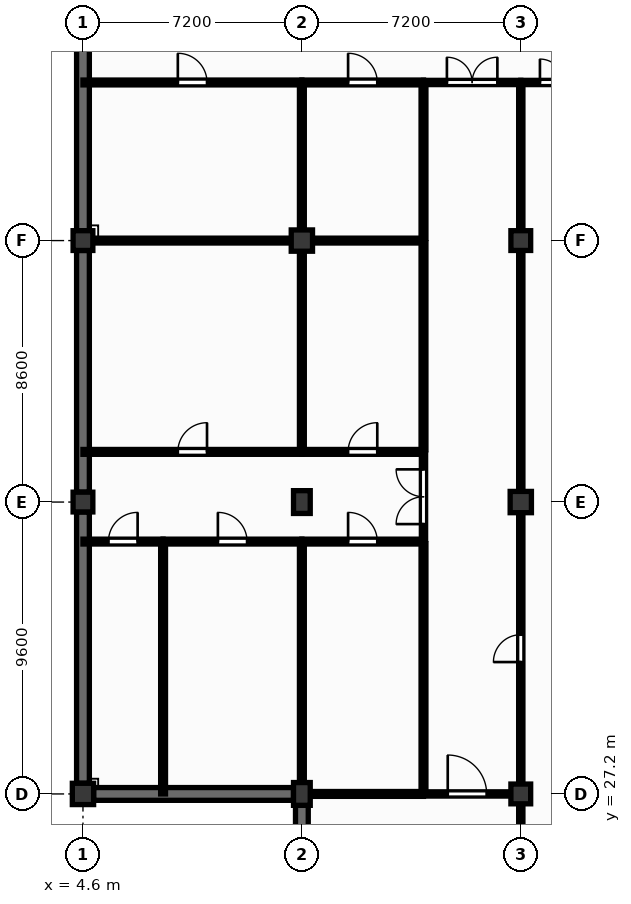
"""IFC4 building model, lengths in metres.
Left out: names, types, materials, properties, quantities, classifications, styles, units other than length and angle.
Written with IfcOpenShell. Run it as: python <this file> out.ifc"""

import sys

from ifc_helpers import new_model, si_unit, direction, frame, frame_2d, origin, origin_2d, place, context, subcontext, project, spatial, rectangle, extrude, element, fill, save


model = new_model("IFC4")
c1 = context("Model", 3, precision=1e-05, world=origin(), true_north=direction((0.0, 1.0)))
c2 = subcontext(c1, "Body", "Model", "MODEL_VIEW")
j1 = project(units=[si_unit("LENGTHUNIT", "METRE"), si_unit("PLANEANGLEUNIT", "RADIAN")], contexts=[c1])
p1 = place(None, origin())
s1 = spatial("IfcSite", under=j1, at=p1, CompositionType="ELEMENT")
p2 = place(p1, origin())
s2 = spatial("IfcBuilding", under=s1, at=p2, CompositionType="ELEMENT")
p3 = place(p2, frame((0.0, 0.0, -4.5)))
s3 = spatial("IfcBuildingStorey", under=s2, at=p3, CompositionType="ELEMENT", Elevation=-4.5)
p4 = place(p3, frame((4.6, 27.2, 0.0), z_axis=(0.0, 0.0, 1.0), x_axis=(1.0, 0.0, 0.0)))
e1 = element("IfcColumn", 1, at=p4, inside=s3, PredefinedType="COLUMN", context=c2, shape_type="SweptSolid", body=[
    extrude(rectangle(XDim=0.7, YDim=0.7, at=origin_2d()), origin(), (0.0, 0.0, 1.0), 4.2),
])
for number, where, z_axis, x_axis in (
    (2, (4.6, 36.8, 0.0), (0.0, 0.0, 1.0), (1.0, 0.0, 0.0)),
    (3, (4.6, 45.4, 0.0), (0.0, 0.0, 1.0), (1.0, 0.0, 0.0)),
):
    element("IfcColumn", number, at=place(p3, frame(where, z_axis=z_axis, x_axis=x_axis)), inside=s3, PredefinedType="COLUMN", context=c2, shape_type="SweptSolid", body=[
        extrude(rectangle(XDim=0.65, YDim=0.65, at=origin_2d()), origin(), (0.0, 0.0, 1.0), 4.2),
    ])
for number, where, z_axis, x_axis in (
    (4, (11.8, 27.2, 0.0), (0.0, 0.0, 1.0), (1.0, 0.0, 0.0)),
    (5, (11.8, 36.8, 0.0), (0.0, 0.0, 1.0), (1.0, 0.0, 0.0)),
):
    element("IfcColumn", number, at=place(p3, frame(where, z_axis=z_axis, x_axis=x_axis)), inside=s3, PredefinedType="COLUMN", context=c2, shape_type="SweptSolid", body=[
        extrude(rectangle(XDim=0.55, YDim=0.75, at=origin_2d()), origin(), (0.0, 0.0, 1.0), 4.2),
    ])
p5 = place(p3, frame((11.8, 45.4, 0.0), z_axis=(0.0, 0.0, 1.0), x_axis=(1.0, 0.0, 0.0)))
e6 = element("IfcColumn", 6, at=p5, inside=s3, PredefinedType="COLUMN", context=c2, shape_type="SweptSolid", body=[
    extrude(rectangle(XDim=0.7, YDim=0.7, at=origin_2d()), origin(), (0.0, 0.0, 1.0), 4.2),
])
p6 = place(p3, frame((19.0, 27.2, 0.0), z_axis=(0.0, 0.0, 1.0), x_axis=(1.0, 0.0, 0.0)))
e7 = element("IfcColumn", 7, at=p6, inside=s3, PredefinedType="COLUMN", context=c2, shape_type="SweptSolid", body=[
    extrude(rectangle(XDim=0.65, YDim=0.65, at=origin_2d()), origin(), (0.0, 0.0, 1.0), 4.2),
])
p7 = place(p3, frame((19.0, 36.8, 0.0), z_axis=(0.0, 0.0, 1.0), x_axis=(1.0, 0.0, 0.0)))
e8 = element("IfcColumn", 8, at=p7, inside=s3, PredefinedType="COLUMN", context=c2, shape_type="SweptSolid", body=[
    extrude(rectangle(XDim=0.7, YDim=0.7, at=origin_2d()), origin(), (0.0, 0.0, 1.0), 4.2),
])
p8 = place(p3, frame((19.0, 45.4, 0.0), z_axis=(0.0, 0.0, 1.0), x_axis=(1.0, 0.0, 0.0)))
e9 = element("IfcColumn", 9, at=p8, inside=s3, PredefinedType="COLUMN", context=c2, shape_type="SweptSolid", body=[
    extrude(rectangle(XDim=0.65, YDim=0.65, at=origin_2d()), origin(), (0.0, 0.0, 1.0), 4.2),
])
p9 = place(p3, frame((4.95, 27.2, 0.0), z_axis=(0.0, 0.0, 1.0), x_axis=(1.0, 0.0, 0.0)))
e10 = element("IfcWall", 10, at=p9, inside=s3, PredefinedType="USERDEFINED", context=c2, shape_type="SweptSolid", body=[
    extrude(rectangle(XDim=6.575, YDim=0.42, at=frame_2d((3.288, 0.0))), origin(), (0.0, 0.0, 1.0), 4.2),
])
p10 = place(p3, frame((4.6, 27.55, 0.0), z_axis=(0.0, 0.0, 1.0), x_axis=(0.0, 1.0, 0.0)))
e11 = element("IfcWall", 11, at=p10, inside=s3, PredefinedType="USERDEFINED", context=c2, shape_type="SweptSolid", body=[
    extrude(rectangle(XDim=8.925, YDim=0.42, at=frame_2d((4.462, 0.0))), origin(), (0.0, 0.0, 1.0), 4.2),
])
p11 = place(p3, frame((4.6, 37.125, 0.0), z_axis=(0.0, 0.0, 1.0), x_axis=(0.0, 1.0, 0.0)))
e12 = element("IfcWall", 12, at=p11, inside=s3, PredefinedType="USERDEFINED", context=c2, shape_type="SweptSolid", body=[
    extrude(rectangle(XDim=7.95, YDim=0.42, at=frame_2d((3.975, 0.0))), origin(), (0.0, 0.0, 1.0), 4.2),
])
p12 = place(p3, frame((4.6, 45.725, 0.0), z_axis=(0.0, 0.0, 1.0), x_axis=(0.0, 1.0, 0.0)))
e13 = element("IfcWall", 13, at=p12, inside=s3, PredefinedType="USERDEFINED", context=c2, shape_type="SweptSolid", body=[
    extrude(rectangle(XDim=6.525, YDim=0.42, at=frame_2d((3.262, 0.0))), origin(), (0.0, 0.0, 1.0), 4.2),
])
p13 = place(p3, frame((11.8, 18.95, 0.0), z_axis=(0.0, 0.0, 1.0), x_axis=(0.0, 1.0, 0.0)))
e14 = element("IfcWall", 14, at=p13, inside=s3, PredefinedType="USERDEFINED", context=c2, shape_type="SweptSolid", body=[
    extrude(rectangle(XDim=7.875, YDim=0.42, at=frame_2d((3.938, 0.0))), origin(), (0.0, 0.0, 1.0), 4.2),
])
p14 = place(p3, frame((4.6, 35.5, 0.0), z_axis=(0.0, 0.0, 1.0), x_axis=(1.0, 0.0, 0.0)))
e15 = element("IfcWall", 15, at=p14, inside=s3, PredefinedType="PARTITIONING", context=c2, shape_type="SweptSolid", body=[
    extrude(rectangle(XDim=2.635, YDim=0.16, at=frame_2d((1.317, 0.0))), origin(), (0.0, 0.0, 1.0), 4.08),
])
p15 = place(p14, frame((0.837, 0.0, 0.0)))
e16 = element("IfcOpeningElement", 16, at=p15, cuts=e15, PredefinedType="OPENING", context=c2, shape_type="SweptSolid", body=[
    extrude(rectangle(XDim=0.96, YDim=2.1, at=frame_2d((0.48, 1.05))), frame((0.0, 0.09, 0.0), z_axis=(0.0, -1.0, 0.0), x_axis=(1.0, 0.0, 0.0)), (0.0, 0.0, 1.0), 0.18),
])
p16 = place(p3, frame((4.6, 38.45, 0.0), z_axis=(0.0, 0.0, 1.0), x_axis=(1.0, 0.0, 0.0)))
e17 = element("IfcWall", 17, at=p16, inside=s3, PredefinedType="PARTITIONING", context=c2, shape_type="SweptSolid", body=[
    extrude(rectangle(XDim=7.2, YDim=0.16, at=frame_2d((3.6, 0.0))), origin(), (0.0, 0.0, 1.0), 4.08),
])
p17 = place(p16, frame((3.12, 0.0, 0.0)))
e18 = element("IfcOpeningElement", 18, at=p17, cuts=e17, PredefinedType="OPENING", context=c2, shape_type="SweptSolid", body=[
    extrude(rectangle(XDim=0.96, YDim=2.1, at=frame_2d((0.48, 1.05))), frame((0.0, 0.09, 0.0), z_axis=(0.0, -1.0, 0.0), x_axis=(1.0, 0.0, 0.0)), (0.0, 0.0, 1.0), 0.18),
])
p18 = place(p3, frame((4.925, 45.4, 0.0), z_axis=(0.0, 0.0, 1.0), x_axis=(1.0, 0.0, 0.0)))
e19 = element("IfcWall", 19, at=p18, inside=s3, PredefinedType="PARTITIONING", context=c2, shape_type="SweptSolid", body=[
    extrude(rectangle(XDim=6.525, YDim=0.16, at=frame_2d((3.262, 0.0))), origin(), (0.0, 0.0, 1.0), 3.6),
])
p19 = place(p3, frame((4.6, 50.6, 0.0), z_axis=(0.0, 0.0, 1.0), x_axis=(1.0, 0.0, 0.0)))
e20 = element("IfcWall", 20, at=p19, inside=s3, PredefinedType="PARTITIONING", context=c2, shape_type="SweptSolid", body=[
    extrude(rectangle(XDim=7.2, YDim=0.16, at=frame_2d((3.6, 0.0))), origin(), (0.0, 0.0, 1.0), 4.08),
])
p20 = place(p19, frame((3.12, 0.0, 0.0)))
e21 = element("IfcOpeningElement", 21, at=p20, cuts=e20, PredefinedType="OPENING", context=c2, shape_type="SweptSolid", body=[
    extrude(rectangle(XDim=0.96, YDim=2.1, at=frame_2d((0.48, 1.05))), frame((0.0, 0.09, 0.0), z_axis=(0.0, -1.0, 0.0), x_axis=(1.0, 0.0, 0.0)), (0.0, 0.0, 1.0), 0.18),
])
p21 = place(p3, frame((7.235, 27.2, 0.0), z_axis=(0.0, 0.0, 1.0), x_axis=(0.0, 1.0, 0.0)))
e22 = element("IfcWall", 22, at=p21, inside=s3, PredefinedType="PARTITIONING", context=c2, shape_type="SweptSolid", body=[
    extrude(rectangle(XDim=8.23, YDim=0.16, at=frame_2d((4.115, 0.0))), origin(), (0.0, 0.0, 1.0), 4.08),
])
p22 = place(p3, frame((7.235, 35.5, 0.0), z_axis=(0.0, 0.0, 1.0), x_axis=(1.0, 0.0, 0.0)))
e23 = element("IfcWall", 23, at=p22, inside=s3, PredefinedType="PARTITIONING", context=c2, shape_type="SweptSolid", body=[
    extrude(rectangle(XDim=4.565, YDim=0.16, at=frame_2d((2.282, 0.0))), origin(), (0.0, 0.0, 1.0), 4.08),
])
p23 = place(p22, frame((1.802, 0.0, 0.0)))
e24 = element("IfcOpeningElement", 24, at=p23, cuts=e23, PredefinedType="OPENING", context=c2, shape_type="SweptSolid", body=[
    extrude(rectangle(XDim=0.96, YDim=2.1, at=frame_2d((0.48, 1.05))), frame((0.0, 0.09, 0.0), z_axis=(0.0, -1.0, 0.0), x_axis=(1.0, 0.0, 0.0)), (0.0, 0.0, 1.0), 0.18),
])
p24 = place(p3, frame((11.8, 27.575, 0.0), z_axis=(0.0, 0.0, 1.0), x_axis=(0.0, 1.0, 0.0)))
e25 = element("IfcWall", 25, at=p24, inside=s3, PredefinedType="PARTITIONING", context=c2, shape_type="SweptSolid", body=[
    extrude(rectangle(XDim=7.855, YDim=0.16, at=frame_2d((3.927, 0.0))), origin(), (0.0, 0.0, 1.0), 3.4),
])
p25 = place(p3, frame((12.075, 27.2, 0.0), z_axis=(0.0, 0.0, 1.0), x_axis=(1.0, 0.0, 0.0)))
e26 = element("IfcWall", 26, at=p25, inside=s3, PredefinedType="PARTITIONING", context=c2, shape_type="SweptSolid", body=[
    extrude(rectangle(XDim=3.725, YDim=0.16, at=frame_2d((1.863, 0.0))), origin(), (0.0, 0.0, 1.0), 3.6),
])
p26 = place(p3, frame((11.8, 35.5, 0.0), z_axis=(0.0, 0.0, 1.0), x_axis=(1.0, 0.0, 0.0)))
e27 = element("IfcWall", 27, at=p26, inside=s3, PredefinedType="PARTITIONING", context=c2, shape_type="SweptSolid", body=[
    extrude(rectangle(XDim=4.0, YDim=0.16, at=frame_2d((2.0, 0.0))), origin(), (0.0, 0.0, 1.0), 4.08),
])
p27 = place(p26, frame((1.52, 0.0, 0.0)))
e28 = element("IfcOpeningElement", 28, at=p27, cuts=e27, PredefinedType="OPENING", context=c2, shape_type="SweptSolid", body=[
    extrude(rectangle(XDim=0.96, YDim=2.1, at=frame_2d((0.48, 1.05))), frame((0.0, 0.09, 0.0), z_axis=(0.0, -1.0, 0.0), x_axis=(1.0, 0.0, 0.0)), (0.0, 0.0, 1.0), 0.18),
])
p28 = place(p3, frame((11.8, 38.52, 0.0), z_axis=(0.0, 0.0, 1.0), x_axis=(0.0, 1.0, 0.0)))
e29 = element("IfcWall", 29, at=p28, inside=s3, PredefinedType="PARTITIONING", context=c2, shape_type="SweptSolid", body=[
    extrude(rectangle(XDim=6.53, YDim=0.16, at=frame_2d((3.265, 0.0))), origin(), (0.0, 0.0, 1.0), 3.5),
])
p29 = place(p3, frame((11.8, 38.45, 0.0), z_axis=(0.0, 0.0, 1.0), x_axis=(1.0, 0.0, 0.0)))
e30 = element("IfcWall", 30, at=p29, inside=s3, PredefinedType="PARTITIONING", context=c2, shape_type="SweptSolid", body=[
    extrude(rectangle(XDim=4.0, YDim=0.16, at=frame_2d((2.0, 0.0))), origin(), (0.0, 0.0, 1.0), 4.08),
])
p30 = place(p29, frame((1.52, 0.0, 0.0)))
e31 = element("IfcOpeningElement", 31, at=p30, cuts=e30, PredefinedType="OPENING", context=c2, shape_type="SweptSolid", body=[
    extrude(rectangle(XDim=0.96, YDim=2.1, at=frame_2d((0.48, 1.05))), frame((0.0, 0.09, 0.0), z_axis=(0.0, -1.0, 0.0), x_axis=(1.0, 0.0, 0.0)), (0.0, 0.0, 1.0), 0.18),
])
p31 = place(p3, frame((11.8, 45.75, 0.0), z_axis=(0.0, 0.0, 1.0), x_axis=(0.0, 1.0, 0.0)))
e32 = element("IfcWall", 32, at=p31, inside=s3, PredefinedType="PARTITIONING", context=c2, shape_type="SweptSolid", body=[
    extrude(rectangle(XDim=4.78, YDim=0.16, at=frame_2d((2.39, 0.0))), origin(), (0.0, 0.0, 1.0), 3.5),
])
p32 = place(p3, frame((12.15, 45.4, 0.0), z_axis=(0.0, 0.0, 1.0), x_axis=(1.0, 0.0, 0.0)))
e33 = element("IfcWall", 33, at=p32, inside=s3, PredefinedType="PARTITIONING", context=c2, shape_type="SweptSolid", body=[
    extrude(rectangle(XDim=3.65, YDim=0.16, at=frame_2d((1.825, 0.0))), origin(), (0.0, 0.0, 1.0), 3.6),
])
p33 = place(p3, frame((11.8, 50.6, 0.0), z_axis=(0.0, 0.0, 1.0), x_axis=(1.0, 0.0, 0.0)))
e34 = element("IfcWall", 34, at=p33, inside=s3, PredefinedType="PARTITIONING", context=c2, shape_type="SweptSolid", body=[
    extrude(rectangle(XDim=4.0, YDim=0.16, at=frame_2d((2.0, 0.0))), origin(), (0.0, 0.0, 1.0), 4.08),
])
p34 = place(p33, frame((1.52, 0.0, 0.0)))
e35 = element("IfcOpeningElement", 35, at=p34, cuts=e34, PredefinedType="OPENING", context=c2, shape_type="SweptSolid", body=[
    extrude(rectangle(XDim=0.96, YDim=2.1, at=frame_2d((0.48, 1.05))), frame((0.0, 0.09, 0.0), z_axis=(0.0, -1.0, 0.0), x_axis=(1.0, 0.0, 0.0)), (0.0, 0.0, 1.0), 0.18),
])
p35 = place(p3, frame((15.8, 27.27, 0.0), z_axis=(0.0, 0.0, 1.0), x_axis=(0.0, 1.0, 0.0)))
e36 = element("IfcWall", 36, at=p35, inside=s3, PredefinedType="PARTITIONING", context=c2, shape_type="SweptSolid", body=[
    extrude(rectangle(XDim=8.16, YDim=0.16, at=frame_2d((4.08, 0.0))), origin(), (0.0, 0.0, 1.0), 4.08),
])
p36 = place(p3, frame((15.8, 27.2, 0.0), z_axis=(0.0, 0.0, 1.0), x_axis=(1.0, 0.0, 0.0)))
e37 = element("IfcWall", 37, at=p36, inside=s3, PredefinedType="PARTITIONING", context=c2, shape_type="SweptSolid", body=[
    extrude(rectangle(XDim=2.875, YDim=0.14, at=frame_2d((1.438, 0.0))), origin(), (0.0, 0.0, 1.0), 3.6),
])
p37 = place(p36, frame((0.798, 0.0, 0.0)))
e38 = element("IfcOpeningElement", 38, at=p37, cuts=e37, PredefinedType="OPENING", context=c2, shape_type="SweptSolid", body=[
    extrude(rectangle(XDim=1.28, YDim=2.2, at=frame_2d((0.64, 1.1))), frame((0.0, 0.08, 0.0), z_axis=(0.0, -1.0, 0.0), x_axis=(1.0, 0.0, 0.0)), (0.0, 0.0, 1.0), 0.16),
])
p38 = place(p3, frame((15.8, 35.57, 0.0), z_axis=(0.0, 0.0, 1.0), x_axis=(0.0, 1.0, 0.0)))
e39 = element("IfcWall", 39, at=p38, inside=s3, PredefinedType="PARTITIONING", context=c2, shape_type="SweptSolid", body=[
    extrude(rectangle(XDim=2.81, YDim=0.14, at=frame_2d((1.405, 0.0))), origin(), (0.0, 0.0, 1.0), 4.08),
])
p39 = place(p38, frame((0.505, 0.0, 0.0)))
e40 = element("IfcOpeningElement", 40, at=p39, cuts=e39, PredefinedType="OPENING", context=c2, shape_type="SweptSolid", body=[
    extrude(rectangle(XDim=1.8, YDim=2.3, at=frame_2d((0.9, 1.15))), frame((0.0, 0.08, 0.0), z_axis=(0.0, -1.0, 0.0), x_axis=(1.0, 0.0, 0.0)), (0.0, 0.0, 1.0), 0.16),
])
p40 = place(p3, frame((15.8, 38.52, 0.0), z_axis=(0.0, 0.0, 1.0), x_axis=(0.0, 1.0, 0.0)))
e41 = element("IfcWall", 41, at=p40, inside=s3, PredefinedType="PARTITIONING", context=c2, shape_type="SweptSolid", body=[
    extrude(rectangle(XDim=6.81, YDim=0.16, at=frame_2d((3.405, 0.0))), origin(), (0.0, 0.0, 1.0), 4.08),
])
p41 = place(p3, frame((15.8, 45.47, 0.0), z_axis=(0.0, 0.0, 1.0), x_axis=(0.0, 1.0, 0.0)))
e42 = element("IfcWall", 42, at=p41, inside=s3, PredefinedType="PARTITIONING", context=c2, shape_type="SweptSolid", body=[
    extrude(rectangle(XDim=5.06, YDim=0.16, at=frame_2d((2.53, 0.0))), origin(), (0.0, 0.0, 1.0), 4.08),
])
p42 = place(p3, frame((15.8, 50.6, 0.0), z_axis=(0.0, 0.0, 1.0), x_axis=(1.0, 0.0, 0.0)))
e43 = element("IfcWall", 43, at=p42, inside=s3, PredefinedType="PARTITIONING", context=c2, shape_type="SweptSolid", body=[
    extrude(rectangle(XDim=3.2, YDim=0.14, at=frame_2d((1.6, 0.0))), origin(), (0.0, 0.0, 1.0), 4.08),
])
p43 = place(p42, frame((0.77, 0.0, 0.0)))
e44 = element("IfcOpeningElement", 44, at=p43, cuts=e43, PredefinedType="OPENING", context=c2, shape_type="SweptSolid", body=[
    extrude(rectangle(XDim=1.66, YDim=2.3, at=frame_2d((0.83, 1.15))), frame((0.0, 0.08, 0.0), z_axis=(0.0, -1.0, 0.0), x_axis=(1.0, 0.0, 0.0)), (0.0, 0.0, 1.0), 0.16),
])
p44 = place(p3, frame((19.0, 18.925, 0.0), z_axis=(0.0, 0.0, 1.0), x_axis=(0.0, 1.0, 0.0)))
e45 = element("IfcWall", 45, at=p44, inside=s3, PredefinedType="PARTITIONING", context=c2, shape_type="SweptSolid", body=[
    extrude(rectangle(XDim=7.95, YDim=0.14, at=frame_2d((3.975, 0.0))), origin(), (0.0, 0.0, 1.0), 3.5),
])
p45 = place(p3, frame((19.0, 27.525, 0.0), z_axis=(0.0, 0.0, 1.0), x_axis=(0.0, 1.0, 0.0)))
e46 = element("IfcWall", 46, at=p45, inside=s3, PredefinedType="PARTITIONING", context=c2, shape_type="SweptSolid", body=[
    extrude(rectangle(XDim=8.925, YDim=0.14, at=frame_2d((4.462, 0.0))), origin(), (0.0, 0.0, 1.0), 3.4),
])
p46 = place(p45, frame((4.012, 0.0, 0.0)))
e47 = element("IfcOpeningElement", 47, at=p46, cuts=e46, PredefinedType="OPENING", context=c2, shape_type="SweptSolid", body=[
    extrude(rectangle(XDim=0.9, YDim=2.1, at=frame_2d((0.45, 1.05))), frame((0.0, 0.08, 0.0), z_axis=(0.0, -1.0, 0.0), x_axis=(1.0, 0.0, 0.0)), (0.0, 0.0, 1.0), 0.16),
])
p47 = place(p3, frame((19.0, 37.15, 0.0), z_axis=(0.0, 0.0, 1.0), x_axis=(0.0, 1.0, 0.0)))
e48 = element("IfcWall", 48, at=p47, inside=s3, PredefinedType="PARTITIONING", context=c2, shape_type="SweptSolid", body=[
    extrude(rectangle(XDim=7.925, YDim=0.14, at=frame_2d((3.962, 0.0))), origin(), (0.0, 0.0, 1.0), 3.5),
])
p48 = place(p3, frame((19.0, 45.725, 0.0), z_axis=(0.0, 0.0, 1.0), x_axis=(0.0, 1.0, 0.0)))
e49 = element("IfcWall", 49, at=p48, inside=s3, PredefinedType="PARTITIONING", context=c2, shape_type="SweptSolid", body=[
    extrude(rectangle(XDim=4.805, YDim=0.14, at=frame_2d((2.402, 0.0))), origin(), (0.0, 0.0, 1.0), 3.5),
])
p49 = place(p3, frame((19.0, 50.6, 0.0), z_axis=(0.0, 0.0, 1.0), x_axis=(1.0, 0.0, 0.0)))
e50 = element("IfcWall", 50, at=p49, inside=s3, PredefinedType="PARTITIONING", context=c2, shape_type="SweptSolid", body=[
    extrude(rectangle(XDim=2.8, YDim=0.14, at=frame_2d((1.4, 0.0))), origin(), (0.0, 0.0, 1.0), 4.08),
])
p50 = place(p49, frame((0.63, 0.0, 0.0)))
e51 = element("IfcOpeningElement", 51, at=p50, cuts=e50, PredefinedType="OPENING", context=c2, shape_type="SweptSolid", body=[
    extrude(rectangle(XDim=1.54, YDim=2.25, at=frame_2d((0.77, 1.125))), frame((0.0, 0.08, 0.0), z_axis=(0.0, -1.0, 0.0), x_axis=(1.0, 0.0, 0.0)), (0.0, 0.0, 1.0), 0.16),
])
p51 = place(p43, origin())
e52 = element("IfcDoor", 52, at=p51, inside=s3, OperationType="DOUBLE_DOOR_SINGLE_SWING", PredefinedType="DOOR", context=c2, shape_type="SweptSolid", body=[
    extrude(rectangle(XDim=1.66, YDim=2.3, at=frame_2d((0.83, 1.15))), frame((0.0, 0.025, 0.0), z_axis=(0.0, -1.0, 0.0), x_axis=(1.0, 0.0, 0.0)), (0.0, 0.0, 1.0), 0.05),
])
fill(e44, e52)
p52 = place(p50, origin())
e53 = element("IfcDoor", 53, at=p52, inside=s3, OperationType="DOUBLE_DOOR_SINGLE_SWING", PredefinedType="DOOR", context=c2, shape_type="SweptSolid", body=[
    extrude(rectangle(XDim=1.54, YDim=2.25, at=frame_2d((0.77, 1.125))), frame((0.0, 0.025, 0.0), z_axis=(0.0, -1.0, 0.0), x_axis=(1.0, 0.0, 0.0)), (0.0, 0.0, 1.0), 0.05),
])
fill(e51, e53)
p53 = place(p39, origin())
e54 = element("IfcDoor", 54, at=p53, inside=s3, OperationType="DOUBLE_DOOR_SINGLE_SWING", PredefinedType="DOOR", context=c2, shape_type="SweptSolid", body=[
    extrude(rectangle(XDim=1.8, YDim=2.3, at=frame_2d((0.9, 1.15))), frame((0.0, 0.025, 0.0), z_axis=(0.0, -1.0, 0.0), x_axis=(1.0, 0.0, 0.0)), (0.0, 0.0, 1.0), 0.05),
])
fill(e40, e54)
p54 = place(p46, origin())
e55 = element("IfcDoor", 55, at=p54, inside=s3, OperationType="SINGLE_SWING_LEFT", PredefinedType="DOOR", context=c2, shape_type="SweptSolid", body=[
    extrude(rectangle(XDim=0.9, YDim=2.1, at=frame_2d((0.45, 1.05))), frame((0.0, 0.025, 0.0), z_axis=(0.0, -1.0, 0.0), x_axis=(1.0, 0.0, 0.0)), (0.0, 0.0, 1.0), 0.05),
])
fill(e47, e55)
p55 = place(p37, origin())
e56 = element("IfcDoor", 56, at=p55, inside=s3, OperationType="SINGLE_SWING_LEFT", PredefinedType="DOOR", context=c2, shape_type="SweptSolid", body=[
    extrude(rectangle(XDim=1.28, YDim=2.2, at=frame_2d((0.64, 1.1))), frame((0.0, 0.025, 0.0), z_axis=(0.0, -1.0, 0.0), x_axis=(1.0, 0.0, 0.0)), (0.0, 0.0, 1.0), 0.05),
])
fill(e38, e56)
p56 = place(p15, origin())
e57 = element("IfcDoor", 57, at=p56, inside=s3, OperationType="SINGLE_SWING_RIGHT", PredefinedType="DOOR", context=c2, shape_type="SweptSolid", body=[
    extrude(rectangle(XDim=0.96, YDim=2.1, at=frame_2d((0.48, 1.05))), frame((0.0, 0.025, 0.0), z_axis=(0.0, -1.0, 0.0), x_axis=(1.0, 0.0, 0.0)), (0.0, 0.0, 1.0), 0.05),
])
fill(e16, e57)
p57 = place(p23, origin())
e58 = element("IfcDoor", 58, at=p57, inside=s3, OperationType="SINGLE_SWING_LEFT", PredefinedType="DOOR", context=c2, shape_type="SweptSolid", body=[
    extrude(rectangle(XDim=0.96, YDim=2.1, at=frame_2d((0.48, 1.05))), frame((0.0, 0.025, 0.0), z_axis=(0.0, -1.0, 0.0), x_axis=(1.0, 0.0, 0.0)), (0.0, 0.0, 1.0), 0.05),
])
fill(e24, e58)
p58 = place(p17, origin())
e59 = element("IfcDoor", 59, at=p58, inside=s3, OperationType="SINGLE_SWING_RIGHT", PredefinedType="DOOR", context=c2, shape_type="SweptSolid", body=[
    extrude(rectangle(XDim=0.96, YDim=2.1, at=frame_2d((0.48, 1.05))), frame((0.0, 0.025, 0.0), z_axis=(0.0, -1.0, 0.0), x_axis=(1.0, 0.0, 0.0)), (0.0, 0.0, 1.0), 0.05),
])
fill(e18, e59)
p59 = place(p20, origin())
e60 = element("IfcDoor", 60, at=p59, inside=s3, OperationType="SINGLE_SWING_LEFT", PredefinedType="DOOR", context=c2, shape_type="SweptSolid", body=[
    extrude(rectangle(XDim=0.96, YDim=2.1, at=frame_2d((0.48, 1.05))), frame((0.0, 0.025, 0.0), z_axis=(0.0, -1.0, 0.0), x_axis=(1.0, 0.0, 0.0)), (0.0, 0.0, 1.0), 0.05),
])
fill(e21, e60)
p60 = place(p27, origin())
e61 = element("IfcDoor", 61, at=p60, inside=s3, OperationType="SINGLE_SWING_LEFT", PredefinedType="DOOR", context=c2, shape_type="SweptSolid", body=[
    extrude(rectangle(XDim=0.96, YDim=2.1, at=frame_2d((0.48, 1.05))), frame((0.0, 0.025, 0.0), z_axis=(0.0, -1.0, 0.0), x_axis=(1.0, 0.0, 0.0)), (0.0, 0.0, 1.0), 0.05),
])
fill(e28, e61)
p61 = place(p30, origin())
e62 = element("IfcDoor", 62, at=p61, inside=s3, OperationType="SINGLE_SWING_RIGHT", PredefinedType="DOOR", context=c2, shape_type="SweptSolid", body=[
    extrude(rectangle(XDim=0.96, YDim=2.1, at=frame_2d((0.48, 1.05))), frame((0.0, 0.025, 0.0), z_axis=(0.0, -1.0, 0.0), x_axis=(1.0, 0.0, 0.0)), (0.0, 0.0, 1.0), 0.05),
])
fill(e31, e62)
p62 = place(p34, origin())
e63 = element("IfcDoor", 63, at=p62, inside=s3, OperationType="SINGLE_SWING_LEFT", PredefinedType="DOOR", context=c2, shape_type="SweptSolid", body=[
    extrude(rectangle(XDim=0.96, YDim=2.1, at=frame_2d((0.48, 1.05))), frame((0.0, 0.025, 0.0), z_axis=(0.0, -1.0, 0.0), x_axis=(1.0, 0.0, 0.0)), (0.0, 0.0, 1.0), 0.05),
])
fill(e35, e63)
save(model, sys.argv[1])
